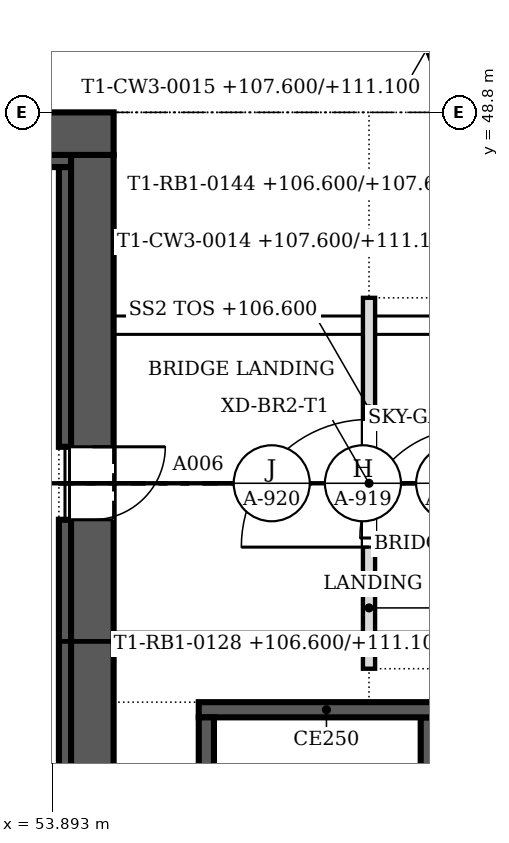
"""IFC4 building model, lengths in metres.
Left out: names, types, materials, properties, quantities, classifications, styles, units other than length and angle.
Written with IfcOpenShell. Run it as: python <this file> out.ifc"""

import sys

from ifc_helpers import new_model, si_unit, direction, frame, frame_2d, origin, place, context, subcontext, project, spatial, polyline, rectangle, outline, extrude, faceted_brep, source, transform, mapped, element, fill, save


model = new_model("IFC4")
c1 = context("Model", 3, precision=1e-05, world=origin(), true_north=direction((0.0, 1.0)))
c2 = subcontext(c1, "Body", "Model", "MODEL_VIEW")
j1 = project(units=[si_unit("LENGTHUNIT", "METRE"), si_unit("PLANEANGLEUNIT", "RADIAN")], contexts=[c1])
p1 = place(None, origin())
s1 = spatial("IfcSite", under=j1, at=p1, CompositionType="ELEMENT")
p2 = place(p1, origin())
s2 = spatial("IfcBuilding", under=s1, at=p2, CompositionType="ELEMENT")
p3 = place(p2, frame((0.0, 0.0, 106.6)))
s3 = spatial("IfcBuildingStorey", under=s2, at=p3, CompositionType="ELEMENT", Elevation=106.6)
m1 = source(origin(), c2, "Body", "SweptSolid", [
    extrude(outline(polyline([(0.0, 0.0), (1.351, 0.0), (1.351, 1.0), (0.0, 1.0), (0.0, 0.0)])), frame((0.0, 0.25, 0.0), z_axis=(0.0, -1.0, 0.0), x_axis=(1.0, 0.0, 0.0)), (0.0, 0.0, 1.0), 0.5),
])
p4 = place(p3, frame((60.462, 49.5, 0.0), z_axis=(0.0, 0.0, 1.0), x_axis=(-0.359923772835, 0.932981713512, 0.0)))
e1 = element("IfcWall", 1, at=p4, inside=s3, PredefinedType="SOLIDWALL", context=c2, shape_type="MappedRepresentation", body=[
    mapped(m1, transform((0.0, 0.0, 0.0), scale=1.0)),
])
m2 = source(origin(), c2, "Body", "Brep", [
    faceted_brep([(0.0, -0.25, 0.0), (2.95, -0.25, 0.0), (2.95, -0.25, 1.5), (0.0, -0.25, 1.5), (0.047, 0.25, 1.5), (2.898, 0.25, 1.5), (2.898, 0.25, 0.0), (0.047, 0.25, 0.0), (2.95, 0.0, 0.0), (0.0, 0.0, 0.0), (2.95, 0.0, 1.5), (0.0, 0.0, 1.5)], [[[0, 1, 2, 3]], [[4, 5, 6, 7]], [[7, 6, 8, 1, 0, 9]], [[10, 2, 1, 8]], [[5, 4, 11, 3, 2, 10]], [[9, 0, 3, 11]], [[7, 9, 11, 4]], [[8, 6, 5, 10]]]),
])
p5 = place(p3, frame((60.75, 48.753, 4.5), z_axis=(0.0, 0.0, 1.0), x_axis=(-0.359877213415, 0.932999673775, 0.0)))
e2 = element("IfcWall", 2, at=p5, inside=s3, PredefinedType="SOLIDWALL", context=c2, shape_type="MappedRepresentation", body=[
    mapped(m2, transform((0.0, 0.0, 0.0), scale=1.0)),
])
p6 = place(p3, frame((30.5, 48.45, 0.0), z_axis=(0.0, 0.0, 1.0), x_axis=(1.0, 0.0, 0.0)))
e3 = element("IfcWall", 3, at=p6, inside=s3, PredefinedType="SHEAR", context=c2, shape_type="SweptSolid", body=[
    extrude(rectangle(XDim=24.4, YDim=0.7, at=frame_2d((12.2, 0.0))), origin(), (0.0, 0.0, 1.0), 6.0),
])
p7 = place(p3, frame((54.55, 48.1, 0.0), z_axis=(0.0, 0.0, 1.0), x_axis=(0.0, -1.0, 0.0)))
e4 = element("IfcWall", 4, at=p7, inside=s3, PredefinedType="SHEAR", context=c2, shape_type="SweptSolid", body=[
    extrude(rectangle(XDim=23.0, YDim=0.7, at=frame_2d((11.5, 0.0))), origin(), (0.0, 0.0, 1.0), 6.0),
])
m3 = source(origin(), c2, "Body", "SweptSolid", [
    extrude(rectangle(XDim=1.2, YDim=2.1, at=frame_2d((0.6, 1.05))), frame((0.0, 0.36, 0.0), z_axis=(0.0, -1.0, 0.0), x_axis=(1.0, 0.0, 0.0)), (0.0, 0.0, 1.0), 0.72),
])
p8 = place(p7, frame((4.8, 0.0, 0.0)))
e5 = element("IfcOpeningElement", 5, at=p8, cuts=e4, PredefinedType="OPENING", context=c2, shape_type="MappedRepresentation", body=[
    mapped(m3, transform((0.0, 0.0, 0.0), scale=1.0)),
])
p9 = place(p3, frame((31.2, 48.0, 0.0), z_axis=(0.0, 0.0, 1.0), x_axis=(1.0, 0.0, 0.0)))
e6 = element("IfcWall", 6, at=p9, inside=s3, PredefinedType="SOLIDWALL", context=c2, shape_type="SweptSolid", body=[
    extrude(rectangle(XDim=23.0, YDim=0.2, at=frame_2d((11.5, 0.0))), origin(), (0.0, 0.0, 1.0), 6.0),
])
p10 = place(p3, frame((54.1, 36.88, 0.0), z_axis=(0.0, 0.0, 1.0), x_axis=(0.0, 1.0, 0.0)))
e7 = element("IfcWall", 7, at=p10, inside=s3, PredefinedType="SOLIDWALL", context=c2, shape_type="SweptSolid", body=[
    extrude(rectangle(XDim=5.22, YDim=0.2, at=frame_2d((2.61, 0.0))), origin(), (0.0, 0.0, 1.0), 6.0),
])
p11 = place(p3, frame((54.1, 43.3, 0.0), z_axis=(0.0, 0.0, 1.0), x_axis=(0.0, 1.0, 0.0)))
e8 = element("IfcWall", 8, at=p11, inside=s3, PredefinedType="SOLIDWALL", context=c2, shape_type="SweptSolid", body=[
    extrude(rectangle(XDim=4.6, YDim=0.2, at=frame_2d((2.3, 0.0))), origin(), (0.0, 0.0, 1.0), 6.0),
])
p12 = place(p3, frame((56.425, 30.85, 0.0), z_axis=(0.0, 0.0, 1.0), x_axis=(0.0, 1.0, 0.0)))
e9 = element("IfcWall", 9, at=p12, inside=s3, PredefinedType="SOLIDWALL", context=c2, shape_type="SweptSolid", body=[
    extrude(rectangle(XDim=8.0, YDim=0.25, at=frame_2d((4.0, 0.0))), origin(), (0.0, 0.0, 1.0), 6.0),
])
p13 = place(p3, frame((56.3, 38.975, 0.0), z_axis=(0.0, 0.0, 1.0), x_axis=(1.0, 0.0, 0.0)))
e10 = element("IfcWall", 10, at=p13, inside=s3, PredefinedType="SOLIDWALL", context=c2, shape_type="SweptSolid", body=[
    extrude(rectangle(XDim=4.2, YDim=0.25, at=frame_2d((2.1, 0.0))), origin(), (0.0, 0.0, 1.0), 6.0),
])
p14 = place(p3, frame((60.225, 38.85, 0.0), z_axis=(0.0, 0.0, 1.0), x_axis=(0.0, -1.0, 0.0)))
e11 = element("IfcWall", 11, at=p14, inside=s3, PredefinedType="SOLIDWALL", context=c2, shape_type="SweptSolid", body=[
    extrude(rectangle(XDim=8.0, YDim=0.55, at=frame_2d((4.0, 0.0))), origin(), (0.0, 0.0, 1.0), 6.0),
])
p15 = place(p3, frame((59.1, 39.65, 0.0), z_axis=(0.0, 0.0, 1.0), x_axis=(0.0, 1.0, 0.0)))
e12 = element("IfcWall", 12, at=p15, inside=s3, PredefinedType="PARTITIONING", context=c2, shape_type="SweptSolid", body=[
    extrude(rectangle(XDim=6.1, YDim=0.2, at=frame_2d((3.05, 0.0))), origin(), (0.0, 0.0, 1.0), 5.267),
])
m4 = source(origin(), c2, "Body", "SweptSolid", [
    extrude(rectangle(XDim=2.1, YDim=2.1, at=frame_2d((1.05, 1.05))), frame((0.0, 0.11, 0.0), z_axis=(0.0, -1.0, 0.0), x_axis=(1.0, 0.0, 0.0)), (0.0, 0.0, 1.0), 0.22),
])
p16 = place(p15, frame((2.0, 0.0, 0.0)))
e13 = element("IfcOpeningElement", 13, at=p16, cuts=e12, PredefinedType="OPENING", context=c2, shape_type="MappedRepresentation", body=[
    mapped(m4, transform((0.0, 0.0, 0.0), scale=1.0)),
])
m5 = source(origin(), c2, "Body", "SweptSolid", [
    extrude(rectangle(XDim=1.2, YDim=2.1, at=frame_2d((0.6, 1.05))), frame((0.0, 0.025, 0.0), z_axis=(0.0, -1.0, 0.0), x_axis=(1.0, 0.0, 0.0)), (0.0, 0.0, 1.0), 0.05),
])
p17 = place(p8, origin())
e14 = element("IfcDoor", 14, at=p17, inside=s3, OperationType="SINGLE_SWING_LEFT", PredefinedType="DOOR", context=c2, shape_type="MappedRepresentation", body=[
    mapped(m5, transform((0.0, 0.0, 0.0), scale=1.0)),
])
fill(e5, e14)
m6 = source(origin(), c2, "Body", "SweptSolid", [
    extrude(rectangle(XDim=2.1, YDim=2.1, at=frame_2d((1.05, 1.05))), frame((0.0, 0.025, 0.0), z_axis=(0.0, -1.0, 0.0), x_axis=(1.0, 0.0, 0.0)), (0.0, 0.0, 1.0), 0.05),
])
p18 = place(p16, origin())
e15 = element("IfcDoor", 15, at=p18, inside=s3, OperationType="DOUBLE_DOOR_SINGLE_SWING", PredefinedType="DOOR", context=c2, shape_type="MappedRepresentation", body=[
    mapped(m6, transform((0.0, 0.0, 0.0), scale=1.0)),
])
fill(e13, e15)
save(model, sys.argv[1])
